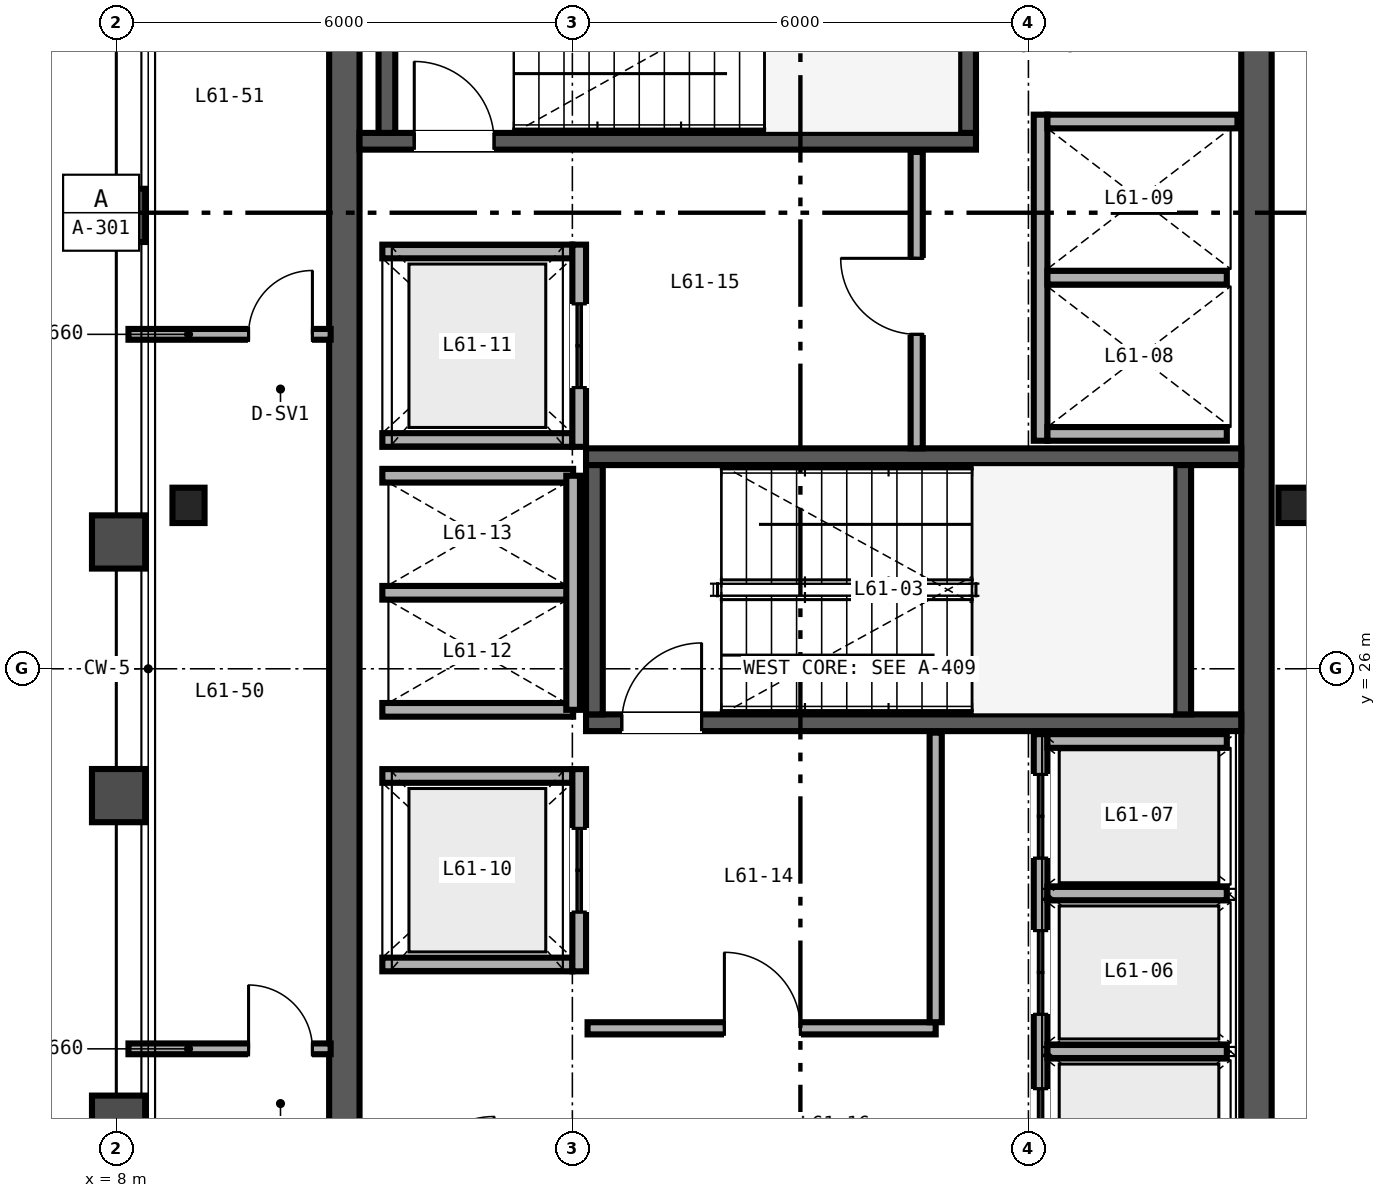
"""IFC4 building model, lengths in metres.
Left out: names, types, materials, properties, quantities, classifications, styles, units other than length and angle.
Written with IfcOpenShell. Run it as: python <this file> out.ifc"""

import sys

from ifc_helpers import new_model, si_unit, direction, frame, frame_2d, origin, origin_2d, place, context, subcontext, project, spatial, rectangle, i_section, extrude, source, transform, mapped, element, fill, save


model = new_model("IFC4")
c1 = context("Model", 3, precision=1e-05, world=origin(), true_north=direction((0.0, 1.0)))
c2 = subcontext(c1, "Body", "Model", "MODEL_VIEW")
j1 = project(units=[si_unit("LENGTHUNIT", "METRE"), si_unit("PLANEANGLEUNIT", "RADIAN")], contexts=[c1])
p1 = place(None, origin())
s1 = spatial("IfcSite", under=j1, at=p1, CompositionType="ELEMENT")
p2 = place(p1, origin())
s2 = spatial("IfcBuilding", under=s1, at=p2, CompositionType="ELEMENT")
p3 = place(p2, frame((0.0, 0.0, 243.6)))
s3 = spatial("IfcBuildingStorey", under=s2, at=p3, CompositionType="ELEMENT", Elevation=243.6)
for number, where, z_axis, x_axis in (
    (1, (11.0, 15.2, 0.0), (0.0, 0.0, 1.0), (0.0, 1.0, 0.0)),
    (2, (23.0, 15.2, 0.0), (0.0, 0.0, 1.0), (0.0, 1.0, 0.0)),
):
    element("IfcWall", number, at=place(p3, frame(where, z_axis=z_axis, x_axis=x_axis)), inside=s3, PredefinedType="SHEAR", context=c2, shape_type="SweptSolid", body=[
        extrude(rectangle(XDim=21.6, YDim=0.4, at=frame_2d((10.8, 0.0))), origin(), (0.0, 0.0, 1.0), 3.28),
    ])
p4 = place(p3, frame((11.2, 32.94, 0.0), z_axis=(0.0, 0.0, 1.0), x_axis=(1.0, 0.0, 0.0)))
e3 = element("IfcWall", 3, at=p4, inside=s3, PredefinedType="SHEAR", context=c2, shape_type="SweptSolid", body=[
    extrude(rectangle(XDim=8.11, YDim=0.22, at=frame_2d((4.055, 0.0))), origin(), (0.0, 0.0, 1.0), 3.4),
])
p5 = place(p4, frame((0.72, 0.0, 0.0)))
e4 = element("IfcOpeningElement", 4, at=p5, cuts=e3, PredefinedType="OPENING", context=c2, shape_type="SweptSolid", body=[
    extrude(rectangle(XDim=1.05, YDim=2.15, at=frame_2d((0.525, 1.075))), frame((0.0, 0.12, 0.0), z_axis=(0.0, -1.0, 0.0), x_axis=(1.0, 0.0, 0.0)), (0.0, 0.0, 1.0), 0.24),
])
for number, where, z_axis, x_axis in (
    (5, (11.56, 33.05, 0.0), (0.0, 0.0, 1.0), (0.0, 1.0, 0.0)),
    (6, (19.2, 33.05, 0.0), (0.0, 0.0, 1.0), (0.0, 1.0, 0.0)),
):
    element("IfcWall", number, at=place(p3, frame(where, z_axis=z_axis, x_axis=x_axis)), inside=s3, PredefinedType="SHEAR", context=c2, shape_type="SweptSolid", body=[
        extrude(rectangle(XDim=3.28, YDim=0.22, at=frame_2d((1.64, 0.0))), origin(), (0.0, 0.0, 1.0), 3.4),
    ])
p6 = place(p3, frame((14.18, 25.29, 0.0), z_axis=(0.0, 0.0, 1.0), x_axis=(1.0, 0.0, 0.0)))
e7 = element("IfcWall", 7, at=p6, inside=s3, PredefinedType="SHEAR", context=c2, shape_type="SweptSolid", body=[
    extrude(rectangle(XDim=8.62, YDim=0.22, at=frame_2d((4.31, 0.0))), origin(), (0.0, 0.0, 1.0), 3.4),
])
p7 = place(p6, frame((0.47, 0.0, 0.0)))
e8 = element("IfcOpeningElement", 8, at=p7, cuts=e7, PredefinedType="OPENING", context=c2, shape_type="SweptSolid", body=[
    extrude(rectangle(XDim=1.05, YDim=2.15, at=frame_2d((0.525, 1.075))), frame((0.0, 0.12, 0.0), z_axis=(0.0, -1.0, 0.0), x_axis=(1.0, 0.0, 0.0)), (0.0, 0.0, 1.0), 0.24),
])
p8 = place(p3, frame((14.18, 28.79, 0.0), z_axis=(0.0, 0.0, 1.0), x_axis=(1.0, 0.0, 0.0)))
e9 = element("IfcWall", 9, at=p8, inside=s3, PredefinedType="SHEAR", context=c2, shape_type="SweptSolid", body=[
    extrude(rectangle(XDim=8.62, YDim=0.22, at=frame_2d((4.31, 0.0))), origin(), (0.0, 0.0, 1.0), 3.4),
])
for number, where, z_axis, x_axis in (
    (10, (14.29, 25.4, 0.0), (0.0, 0.0, 1.0), (0.0, 1.0, 0.0)),
    (11, (22.03, 25.4, 0.0), (0.0, 0.0, 1.0), (0.0, 1.0, 0.0)),
):
    element("IfcWall", number, at=place(p3, frame(where, z_axis=z_axis, x_axis=x_axis)), inside=s3, PredefinedType="SHEAR", context=c2, shape_type="SweptSolid", body=[
        extrude(rectangle(XDim=3.28, YDim=0.22, at=frame_2d((1.64, 0.0))), origin(), (0.0, 0.0, 1.0), 3.4),
    ])
m1 = source(origin(), c2, "Body", "SweptSolid", [
    extrude(i_section(OverallWidth=0.422, OverallDepth=0.465, WebThickness=0.045, FlangeThickness=0.073, FilletRadius=0.025, at=origin_2d()), origin(), (0.0, 0.0, 1.0), 3.28),
])
for number, where, z_axis, x_axis in (
    (12, (8.95, 28.15, 0.0), (0.0, 0.0, 1.0), (1.0, 0.0, 0.0)),
    (13, (23.5, 28.15, 0.0), (0.0, 0.0, 1.0), (1.0, 0.0, 0.0)),
):
    element("IfcColumn", number, at=place(p3, frame(where, z_axis=z_axis, x_axis=x_axis)), inside=s3, PredefinedType="COLUMN", context=c2, shape_type="MappedRepresentation", body=[
        mapped(m1, transform((0.0, 0.0, 0.0), scale=1.0)),
    ])
p9 = place(p3, frame((20.16, 18.82, 0.0), z_axis=(0.0, 0.0, 1.0), x_axis=(0.0, 1.0, 0.0)))
e14 = element("IfcWall", 14, at=p9, inside=s3, PredefinedType="SOLIDWALL", context=c2, shape_type="SweptSolid", body=[
    extrude(rectangle(XDim=6.32, YDim=0.18, at=frame_2d((3.16, 0.0))), origin(), (0.0, 0.0, 1.0), 2.38),
])
p10 = place(p9, frame((0.555, 0.0, 0.0)))
e15 = element("IfcOpeningElement", 15, at=p10, cuts=e14, PredefinedType="OPENING", context=c2, shape_type="SweptSolid", body=[
    extrude(rectangle(XDim=1.1, YDim=2.2, at=frame_2d((0.55, 1.1))), frame((0.0, 0.1, 0.0), z_axis=(0.0, -1.0, 0.0), x_axis=(1.0, 0.0, 0.0)), (0.0, 0.0, 1.0), 0.2),
])
p11 = place(p9, frame((2.635, 0.0, 0.0)))
e16 = element("IfcOpeningElement", 16, at=p11, cuts=e14, PredefinedType="OPENING", context=c2, shape_type="SweptSolid", body=[
    extrude(rectangle(XDim=1.1, YDim=2.2, at=frame_2d((0.55, 1.1))), frame((0.0, 0.1, 0.0), z_axis=(0.0, -1.0, 0.0), x_axis=(1.0, 0.0, 0.0)), (0.0, 0.0, 1.0), 0.2),
])
p12 = place(p9, frame((4.69, 0.0, 0.0)))
e17 = element("IfcOpeningElement", 17, at=p12, cuts=e14, PredefinedType="OPENING", context=c2, shape_type="SweptSolid", body=[
    extrude(rectangle(XDim=1.1, YDim=2.2, at=frame_2d((0.55, 1.1))), frame((0.0, 0.1, 0.0), z_axis=(0.0, -1.0, 0.0), x_axis=(1.0, 0.0, 0.0)), (0.0, 0.0, 1.0), 0.2),
])
p13 = place(p3, frame((20.25, 25.05, 0.0), z_axis=(0.0, 0.0, 1.0), x_axis=(1.0, 0.0, 0.0)))
e18 = element("IfcWall", 18, at=p13, inside=s3, PredefinedType="SOLIDWALL", context=c2, shape_type="SweptSolid", body=[
    extrude(rectangle(XDim=2.36, YDim=0.18, at=frame_2d((1.18, 0.0))), origin(), (0.0, 0.0, 1.0), 3.28),
])
p14 = place(p3, frame((20.25, 20.965, 0.0), z_axis=(0.0, 0.0, 1.0), x_axis=(1.0, 0.0, 0.0)))
e19 = element("IfcWall", 19, at=p14, inside=s3, PredefinedType="SOLIDWALL", context=c2, shape_type="SweptSolid", body=[
    extrude(rectangle(XDim=2.36, YDim=0.18, at=frame_2d((1.18, 0.0))), origin(), (0.0, 0.0, 1.0), 2.38),
])
p15 = place(p3, frame((20.25, 23.045, 0.0), z_axis=(0.0, 0.0, 1.0), x_axis=(1.0, 0.0, 0.0)))
e20 = element("IfcWall", 20, at=p15, inside=s3, PredefinedType="SOLIDWALL", context=c2, shape_type="SweptSolid", body=[
    extrude(rectangle(XDim=2.36, YDim=0.18, at=frame_2d((1.18, 0.0))), origin(), (0.0, 0.0, 1.0), 3.28),
])
p16 = place(p3, frame((20.16, 29.0, 0.0), z_axis=(0.0, 0.0, 1.0), x_axis=(0.0, 1.0, 0.0)))
e21 = element("IfcWall", 21, at=p16, inside=s3, PredefinedType="SOLIDWALL", context=c2, shape_type="SweptSolid", body=[
    extrude(rectangle(XDim=4.29, YDim=0.18, at=frame_2d((2.145, 0.0))), origin(), (0.0, 0.0, 1.0), 3.28),
])
p17 = place(p3, frame((20.25, 29.09, 0.0), z_axis=(0.0, 0.0, 1.0), x_axis=(1.0, 0.0, 0.0)))
e22 = element("IfcWall", 22, at=p17, inside=s3, PredefinedType="SOLIDWALL", context=c2, shape_type="SweptSolid", body=[
    extrude(rectangle(XDim=2.36, YDim=0.18, at=frame_2d((1.18, 0.0))), origin(), (0.0, 0.0, 1.0), 3.28),
])
p18 = place(p3, frame((20.25, 33.2, 0.0), z_axis=(0.0, 0.0, 1.0), x_axis=(1.0, 0.0, 0.0)))
e23 = element("IfcWall", 23, at=p18, inside=s3, PredefinedType="SOLIDWALL", context=c2, shape_type="SweptSolid", body=[
    extrude(rectangle(XDim=2.5, YDim=0.18, at=frame_2d((1.25, 0.0))), origin(), (0.0, 0.0, 1.0), 3.28),
])
p19 = place(p3, frame((20.25, 31.145, 0.0), z_axis=(0.0, 0.0, 1.0), x_axis=(1.0, 0.0, 0.0)))
e24 = element("IfcWall", 24, at=p19, inside=s3, PredefinedType="SOLIDWALL", context=c2, shape_type="SweptSolid", body=[
    extrude(rectangle(XDim=2.36, YDim=0.18, at=frame_2d((1.18, 0.0))), origin(), (0.0, 0.0, 1.0), 3.28),
])
for number, where, z_axis, x_axis in (
    (25, (11.5, 22.11, 0.0), (0.0, 0.0, 1.0), (1.0, 0.0, 0.0)),
    (26, (11.5, 24.59, 0.0), (0.0, 0.0, 1.0), (1.0, 0.0, 0.0)),
):
    element("IfcWall", number, at=place(p3, frame(where, z_axis=z_axis, x_axis=x_axis)), inside=s3, PredefinedType="SOLIDWALL", context=c2, shape_type="SweptSolid", body=[
        extrude(rectangle(XDim=2.5, YDim=0.18, at=frame_2d((1.25, 0.0))), origin(), (0.0, 0.0, 1.0), 3.28),
    ])
p20 = place(p3, frame((14.09, 22.02, 0.0), z_axis=(0.0, 0.0, 1.0), x_axis=(0.0, 1.0, 0.0)))
e27 = element("IfcWall", 27, at=p20, inside=s3, PredefinedType="SOLIDWALL", context=c2, shape_type="SweptSolid", body=[
    extrude(rectangle(XDim=2.66, YDim=0.18, at=frame_2d((1.33, 0.0))), origin(), (0.0, 0.0, 1.0), 3.28),
])
p21 = place(p20, frame((0.78, 0.0, 0.0)))
e28 = element("IfcOpeningElement", 28, at=p21, cuts=e27, PredefinedType="OPENING", context=c2, shape_type="SweptSolid", body=[
    extrude(rectangle(XDim=1.1, YDim=2.2, at=frame_2d((0.55, 1.1))), frame((0.0, 0.1, 0.0), z_axis=(0.0, -1.0, 0.0), x_axis=(1.0, 0.0, 0.0)), (0.0, 0.0, 1.0), 0.2),
])
for number, where, z_axis, x_axis in (
    (29, (11.5, 29.01, 0.0), (0.0, 0.0, 1.0), (1.0, 0.0, 0.0)),
    (30, (11.5, 31.49, 0.0), (0.0, 0.0, 1.0), (1.0, 0.0, 0.0)),
):
    element("IfcWall", number, at=place(p3, frame(where, z_axis=z_axis, x_axis=x_axis)), inside=s3, PredefinedType="SOLIDWALL", context=c2, shape_type="SweptSolid", body=[
        extrude(rectangle(XDim=2.5, YDim=0.18, at=frame_2d((1.25, 0.0))), origin(), (0.0, 0.0, 1.0), 3.28),
    ])
p22 = place(p3, frame((14.09, 28.92, 0.0), z_axis=(0.0, 0.0, 1.0), x_axis=(0.0, 1.0, 0.0)))
e31 = element("IfcWall", 31, at=p22, inside=s3, PredefinedType="SOLIDWALL", context=c2, shape_type="SweptSolid", body=[
    extrude(rectangle(XDim=2.66, YDim=0.18, at=frame_2d((1.33, 0.0))), origin(), (0.0, 0.0, 1.0), 3.28),
])
p23 = place(p22, frame((0.78, 0.0, 0.0)))
e32 = element("IfcOpeningElement", 32, at=p23, cuts=e31, PredefinedType="OPENING", context=c2, shape_type="SweptSolid", body=[
    extrude(rectangle(XDim=1.1, YDim=2.2, at=frame_2d((0.55, 1.1))), frame((0.0, 0.1, 0.0), z_axis=(0.0, -1.0, 0.0), x_axis=(1.0, 0.0, 0.0)), (0.0, 0.0, 1.0), 0.2),
])
for number, where, z_axis, x_axis in (
    (33, (11.5, 25.46, 0.0), (0.0, 0.0, 1.0), (1.0, 0.0, 0.0)),
    (34, (11.5, 27.0, 0.0), (0.0, 0.0, 1.0), (1.0, 0.0, 0.0)),
    (35, (11.5, 28.54, 0.0), (0.0, 0.0, 1.0), (1.0, 0.0, 0.0)),
):
    element("IfcWall", number, at=place(p3, frame(where, z_axis=z_axis, x_axis=x_axis)), inside=s3, PredefinedType="SOLIDWALL", context=c2, shape_type="SweptSolid", body=[
        extrude(rectangle(XDim=2.51, YDim=0.18, at=frame_2d((1.255, 0.0))), origin(), (0.0, 0.0, 1.0), 3.28),
    ])
p24 = place(p3, frame((14.01, 25.46, 0.0), z_axis=(0.0, 0.0, 1.0), x_axis=(0.0, 1.0, 0.0)))
e36 = element("IfcWall", 36, at=p24, inside=s3, PredefinedType="SOLIDWALL", context=c2, shape_type="SweptSolid", body=[
    extrude(rectangle(XDim=3.08, YDim=0.18, at=frame_2d((1.54, 0.0))), origin(), (0.0, 0.0, 1.0), 3.28),
])
p25 = place(p3, frame((14.2, 21.27, 0.0), z_axis=(0.0, 0.0, 1.0), x_axis=(1.0, 0.0, 0.0)))
e37 = element("IfcWall", 37, at=p25, inside=s3, PredefinedType="PARTITIONING", context=c2, shape_type="SweptSolid", body=[
    extrude(rectangle(XDim=4.58, YDim=0.16, at=frame_2d((2.29, 0.0))), origin(), (0.0, 0.0, 1.0), 3.28),
])
p26 = place(p25, frame((1.8, 0.0, 0.0)))
e38 = element("IfcOpeningElement", 38, at=p26, cuts=e37, PredefinedType="OPENING", context=c2, shape_type="SweptSolid", body=[
    extrude(rectangle(XDim=1.0, YDim=2.15, at=frame_2d((0.5, 1.075))), frame((0.0, 0.09, 0.0), z_axis=(0.0, -1.0, 0.0), x_axis=(1.0, 0.0, 0.0)), (0.0, 0.0, 1.0), 0.18),
])
p27 = place(p3, frame((18.78, 21.35, 0.0), z_axis=(0.0, 0.0, 1.0), x_axis=(0.0, 1.0, 0.0)))
e39 = element("IfcWall", 39, at=p27, inside=s3, PredefinedType="PARTITIONING", context=c2, shape_type="SweptSolid", body=[
    extrude(rectangle(XDim=3.81, YDim=0.16, at=frame_2d((1.905, 0.0))), origin(), (0.0, 0.0, 1.0), 3.28),
])
p28 = place(p3, frame((18.53, 28.9, 0.0), z_axis=(0.0, 0.0, 1.0), x_axis=(0.0, 1.0, 0.0)))
e40 = element("IfcWall", 40, at=p28, inside=s3, PredefinedType="PARTITIONING", context=c2, shape_type="SweptSolid", body=[
    extrude(rectangle(XDim=3.9, YDim=0.16, at=frame_2d((1.95, 0.0))), origin(), (0.0, 0.0, 1.0), 3.28),
])
p29 = place(p28, frame((1.5, 0.0, 0.0)))
e41 = element("IfcOpeningElement", 41, at=p29, cuts=e40, PredefinedType="OPENING", context=c2, shape_type="SweptSolid", body=[
    extrude(rectangle(XDim=1.0, YDim=2.15, at=frame_2d((0.5, 1.075))), frame((0.0, 0.09, 0.0), z_axis=(0.0, -1.0, 0.0), x_axis=(1.0, 0.0, 0.0)), (0.0, 0.0, 1.0), 0.18),
])
p30 = place(p3, frame((8.16, 21.0, 0.0), z_axis=(0.0, 0.0, 1.0), x_axis=(1.0, 0.0, 0.0)))
e42 = element("IfcWall", 42, at=p30, inside=s3, PredefinedType="PARTITIONING", context=c2, shape_type="SweptSolid", body=[
    extrude(rectangle(XDim=2.66, YDim=0.142, at=frame_2d((1.33, 0.0))), origin(), (0.0, 0.0, 1.0), 2.38),
])
p31 = place(p30, frame((1.58, 0.0, 0.0)))
e43 = element("IfcOpeningElement", 43, at=p31, cuts=e42, PredefinedType="OPENING", context=c2, shape_type="SweptSolid", body=[
    extrude(rectangle(XDim=0.84, YDim=2.1, at=frame_2d((0.42, 1.05))), frame((0.0, 0.081, 0.0), z_axis=(0.0, -1.0, 0.0), x_axis=(1.0, 0.0, 0.0)), (0.0, 0.0, 1.0), 0.162),
])
p32 = place(p3, frame((8.16, 30.4, 0.0), z_axis=(0.0, 0.0, 1.0), x_axis=(1.0, 0.0, 0.0)))
e44 = element("IfcWall", 44, at=p32, inside=s3, PredefinedType="PARTITIONING", context=c2, shape_type="SweptSolid", body=[
    extrude(rectangle(XDim=2.66, YDim=0.142, at=frame_2d((1.33, 0.0))), origin(), (0.0, 0.0, 1.0), 2.663),
])
p33 = place(p32, frame((1.58, 0.0, 0.0)))
e45 = element("IfcOpeningElement", 45, at=p33, cuts=e44, PredefinedType="OPENING", context=c2, shape_type="SweptSolid", body=[
    extrude(rectangle(XDim=0.84, YDim=2.1, at=frame_2d((0.42, 1.05))), frame((0.0, 0.081, 0.0), z_axis=(0.0, -1.0, 0.0), x_axis=(1.0, 0.0, 0.0)), (0.0, 0.0, 1.0), 0.162),
])
m2 = source(origin(), c2, "Body", "SweptSolid", [
    extrude(rectangle(XDim=1.05, YDim=2.15, at=frame_2d((0.525, 1.075))), frame((0.0, 0.025, 0.0), z_axis=(0.0, -1.0, 0.0), x_axis=(1.0, 0.0, 0.0)), (0.0, 0.0, 1.0), 0.05),
])
p34 = place(p5, origin())
e46 = element("IfcDoor", 46, at=p34, inside=s3, OperationType="SINGLE_SWING_LEFT", PredefinedType="DOOR", context=c2, shape_type="MappedRepresentation", body=[
    mapped(m2, transform((0.0, 0.0, 0.0), scale=1.0)),
])
fill(e4, e46)
p35 = place(p7, origin())
e47 = element("IfcDoor", 47, at=p35, inside=s3, OperationType="SINGLE_SWING_RIGHT", PredefinedType="DOOR", context=c2, shape_type="MappedRepresentation", body=[
    mapped(m2, transform((0.0, 0.0, 0.0), scale=1.0)),
])
fill(e8, e47)
m3 = source(origin(), c2, "Body", "SweptSolid", [
    extrude(rectangle(XDim=1.1, YDim=2.2, at=frame_2d((0.55, 1.1))), frame((0.0, 0.025, 0.0), z_axis=(0.0, -1.0, 0.0), x_axis=(1.0, 0.0, 0.0)), (0.0, 0.0, 1.0), 0.05),
])
p36 = place(p10, origin())
e48 = element("IfcDoor", 48, at=p36, inside=s3, OperationType="DOUBLE_DOOR_SLIDING", PredefinedType="DOOR", context=c2, shape_type="MappedRepresentation", body=[
    mapped(m3, transform((0.0, 0.0, 0.0), scale=1.0)),
])
fill(e15, e48)
p37 = place(p11, origin())
e49 = element("IfcDoor", 49, at=p37, inside=s3, OperationType="DOUBLE_DOOR_SLIDING", PredefinedType="DOOR", context=c2, shape_type="MappedRepresentation", body=[
    mapped(m3, transform((0.0, 0.0, 0.0), scale=1.0)),
])
fill(e16, e49)
p38 = place(p12, origin())
e50 = element("IfcDoor", 50, at=p38, inside=s3, OperationType="DOUBLE_DOOR_SLIDING", PredefinedType="DOOR", context=c2, shape_type="MappedRepresentation", body=[
    mapped(m3, transform((0.0, 0.0, 0.0), scale=1.0)),
])
fill(e17, e50)
p39 = place(p21, origin())
e51 = element("IfcDoor", 51, at=p39, inside=s3, OperationType="DOUBLE_DOOR_SLIDING", PredefinedType="DOOR", context=c2, shape_type="MappedRepresentation", body=[
    mapped(m3, transform((0.0, 0.0, 0.0), scale=1.0)),
])
fill(e28, e51)
p40 = place(p23, origin())
e52 = element("IfcDoor", 52, at=p40, inside=s3, OperationType="DOUBLE_DOOR_SLIDING", PredefinedType="DOOR", context=c2, shape_type="MappedRepresentation", body=[
    mapped(m3, transform((0.0, 0.0, 0.0), scale=1.0)),
])
fill(e32, e52)
m4 = source(origin(), c2, "Body", "SweptSolid", [
    extrude(rectangle(XDim=1.0, YDim=2.15, at=frame_2d((0.5, 1.075))), frame((0.0, 0.025, 0.0), z_axis=(0.0, -1.0, 0.0), x_axis=(1.0, 0.0, 0.0)), (0.0, 0.0, 1.0), 0.05),
])
p41 = place(p26, origin())
e53 = element("IfcDoor", 53, at=p41, inside=s3, OperationType="SINGLE_SWING_LEFT", PredefinedType="DOOR", context=c2, shape_type="MappedRepresentation", body=[
    mapped(m4, transform((0.0, 0.0, 0.0), scale=1.0)),
])
fill(e38, e53)
p42 = place(p29, origin())
e54 = element("IfcDoor", 54, at=p42, inside=s3, OperationType="SINGLE_SWING_RIGHT", PredefinedType="DOOR", context=c2, shape_type="MappedRepresentation", body=[
    mapped(m4, transform((0.0, 0.0, 0.0), scale=1.0)),
])
fill(e41, e54)
m5 = source(origin(), c2, "Body", "SweptSolid", [
    extrude(rectangle(XDim=0.84, YDim=2.1, at=frame_2d((0.42, 1.05))), frame((0.0, 0.025, 0.0), z_axis=(0.0, -1.0, 0.0), x_axis=(1.0, 0.0, 0.0)), (0.0, 0.0, 1.0), 0.05),
])
p43 = place(p31, origin())
e55 = element("IfcDoor", 55, at=p43, inside=s3, OperationType="SINGLE_SWING_LEFT", PredefinedType="DOOR", context=c2, shape_type="MappedRepresentation", body=[
    mapped(m5, transform((0.0, 0.0, 0.0), scale=1.0)),
])
fill(e43, e55)
p44 = place(p33, origin())
e56 = element("IfcDoor", 56, at=p44, inside=s3, OperationType="SINGLE_SWING_RIGHT", PredefinedType="DOOR", context=c2, shape_type="MappedRepresentation", body=[
    mapped(m5, transform((0.0, 0.0, 0.0), scale=1.0)),
])
fill(e45, e56)
save(model, sys.argv[1])
